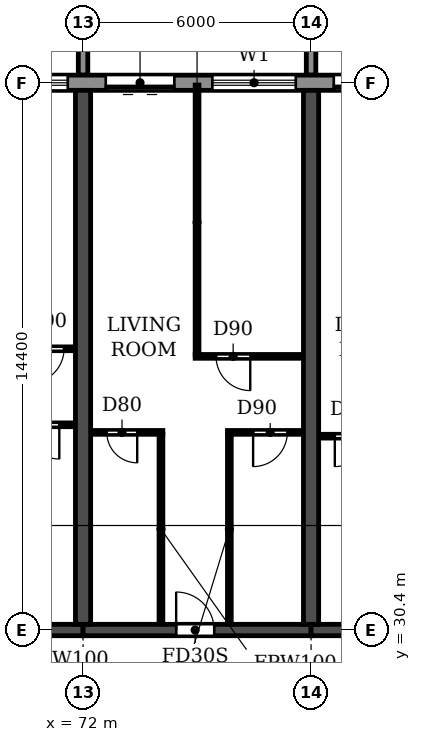
"""IFC4 building model, lengths in metres.
Left out: names, types, materials, properties, quantities, classifications, styles, units other than length and angle.
Written with IfcOpenShell. Run it as: python <this file> out.ifc"""

import sys

from ifc_helpers import new_model, si_unit, direction, frame, frame_2d, origin, place, context, subcontext, project, spatial, polyline, rectangle, outline, extrude, source, transform, mapped, element, fill, save


model = new_model("IFC4")
c1 = context("Model", 3, precision=1e-05, world=origin(), true_north=direction((0.0, 1.0)))
c2 = subcontext(c1, "Body", "Model", "MODEL_VIEW")
j1 = project(units=[si_unit("LENGTHUNIT", "METRE"), si_unit("PLANEANGLEUNIT", "RADIAN")], contexts=[c1])
p1 = place(None, origin())
s1 = spatial("IfcSite", under=j1, at=p1, CompositionType="ELEMENT")
p2 = place(p1, origin())
s2 = spatial("IfcBuilding", under=s1, at=p2, CompositionType="ELEMENT")
p3 = place(p2, frame((0.0, 0.0, 56.4)))
s3 = spatial("IfcBuildingStorey", under=s2, at=p3, CompositionType="ELEMENT", Elevation=56.4)
for number, where, z_axis, x_axis in (
    (1, (72.0, 30.55, 0.0), (0.0, 0.0, 1.0), (0.0, 1.0, 0.0)),
    (2, (78.0, 30.55, 0.0), (0.0, 0.0, 1.0), (0.0, 1.0, 0.0)),
):
    element("IfcWall", number, at=place(p3, frame(where, z_axis=z_axis, x_axis=x_axis)), inside=s3, PredefinedType="SHEAR", context=c2, shape_type="SweptSolid", body=[
        extrude(rectangle(XDim=14.05, YDim=0.4, at=frame_2d((7.025, 0.0))), origin(), (0.0, 0.0, 1.0), 3.05),
    ])
p4 = place(p3, frame((66.0, 30.4, 0.0), z_axis=(0.0, 0.0, 1.0), x_axis=(1.0, 0.0, 0.0)))
e3 = element("IfcWall", 3, at=p4, inside=s3, PredefinedType="SHEAR", context=c2, shape_type="SweptSolid", body=[
    extrude(rectangle(XDim=6.0, YDim=0.3, at=frame_2d((3.0, 0.0))), origin(), (0.0, 0.0, 1.0), 2.45),
])
p5 = place(p4, frame((2.45, 0.0, 0.0)))
e4 = element("IfcOpeningElement", 4, at=p5, cuts=e3, PredefinedType="OPENING", context=c2, shape_type="SweptSolid", body=[
    extrude(rectangle(XDim=1.0, YDim=2.1, at=frame_2d((0.5, 1.05))), frame((0.0, 0.16, 0.0), z_axis=(0.0, -1.0, 0.0), x_axis=(1.0, 0.0, 0.0)), (0.0, 0.0, 1.0), 0.32),
])
p6 = place(p3, frame((72.0, 30.4, 0.0), z_axis=(0.0, 0.0, 1.0), x_axis=(1.0, 0.0, 0.0)))
e5 = element("IfcWall", 5, at=p6, inside=s3, PredefinedType="SHEAR", context=c2, shape_type="SweptSolid", body=[
    extrude(rectangle(XDim=6.0, YDim=0.3, at=frame_2d((3.0, 0.0))), origin(), (0.0, 0.0, 1.0), 2.45),
])
p7 = place(p6, frame((2.45, 0.0, 0.0)))
e6 = element("IfcOpeningElement", 6, at=p7, cuts=e5, PredefinedType="OPENING", context=c2, shape_type="SweptSolid", body=[
    extrude(rectangle(XDim=1.0, YDim=2.1, at=frame_2d((0.5, 1.05))), frame((0.0, 0.16, 0.0), z_axis=(0.0, -1.0, 0.0), x_axis=(1.0, 0.0, 0.0)), (0.0, 0.0, 1.0), 0.32),
])
p8 = place(p3, frame((78.0, 30.4, 0.0), z_axis=(0.0, 0.0, 1.0), x_axis=(1.0, 0.0, 0.0)))
e7 = element("IfcWall", 7, at=p8, inside=s3, PredefinedType="SHEAR", context=c2, shape_type="SweptSolid", body=[
    extrude(rectangle(XDim=6.0, YDim=0.3, at=frame_2d((3.0, 0.0))), origin(), (0.0, 0.0, 1.0), 2.45),
])
p9 = place(p8, frame((2.45, 0.0, 0.0)))
e8 = element("IfcOpeningElement", 8, at=p9, cuts=e7, PredefinedType="OPENING", context=c2, shape_type="SweptSolid", body=[
    extrude(rectangle(XDim=1.0, YDim=2.1, at=frame_2d((0.5, 1.05))), frame((0.0, 0.16, 0.0), z_axis=(0.0, -1.0, 0.0), x_axis=(1.0, 0.0, 0.0)), (0.0, 0.0, 1.0), 0.32),
])
p10 = place(p3, frame((91.317, 44.8, 0.0), z_axis=(0.0, 0.0, 1.0), x_axis=(-1.0, 0.0, 0.0)))
e9 = element("IfcWall", 9, at=p10, inside=s3, PredefinedType="STANDARD", context=c2, shape_type="SweptSolid", body=[
    extrude(rectangle(XDim=80.634, YDim=0.4, at=frame_2d((40.317, 0.0))), origin(), (0.0, 0.0, 1.0), 3.05),
])
p11 = place(p10, frame((76.717, 0.0, 0.9)))
e10 = element("IfcOpeningElement", 10, at=p11, cuts=e9, PredefinedType="OPENING", context=c2, shape_type="SweptSolid", body=[
    extrude(rectangle(XDim=2.2, YDim=1.5, at=frame_2d((1.1, 0.75))), frame((0.0, 0.21, 0.0), z_axis=(0.0, -1.0, 0.0), x_axis=(1.0, 0.0, 0.0)), (0.0, 0.0, 1.0), 0.42),
])
p12 = place(p10, frame((73.917, 0.0, 0.0)))
e11 = element("IfcOpeningElement", 11, at=p12, cuts=e9, PredefinedType="OPENING", context=c2, shape_type="SweptSolid", body=[
    extrude(rectangle(XDim=1.8, YDim=2.4, at=frame_2d((0.9, 1.2))), frame((0.0, 0.21, 0.0), z_axis=(0.0, -1.0, 0.0), x_axis=(1.0, 0.0, 0.0)), (0.0, 0.0, 1.0), 0.42),
])
p13 = place(p10, frame((70.717, 0.0, 0.9)))
e12 = element("IfcOpeningElement", 12, at=p13, cuts=e9, PredefinedType="OPENING", context=c2, shape_type="SweptSolid", body=[
    extrude(rectangle(XDim=2.2, YDim=1.5, at=frame_2d((1.1, 0.75))), frame((0.0, 0.21, 0.0), z_axis=(0.0, -1.0, 0.0), x_axis=(1.0, 0.0, 0.0)), (0.0, 0.0, 1.0), 0.42),
])
p14 = place(p10, frame((67.917, 0.0, 0.0)))
e13 = element("IfcOpeningElement", 13, at=p14, cuts=e9, PredefinedType="OPENING", context=c2, shape_type="SweptSolid", body=[
    extrude(rectangle(XDim=1.8, YDim=2.4, at=frame_2d((0.9, 1.2))), frame((0.0, 0.21, 0.0), z_axis=(0.0, -1.0, 0.0), x_axis=(1.0, 0.0, 0.0)), (0.0, 0.0, 1.0), 0.42),
])
p15 = place(p10, frame((64.717, 0.0, 0.9)))
e14 = element("IfcOpeningElement", 14, at=p15, cuts=e9, PredefinedType="OPENING", context=c2, shape_type="SweptSolid", body=[
    extrude(rectangle(XDim=2.2, YDim=1.5, at=frame_2d((1.1, 0.75))), frame((0.0, 0.21, 0.0), z_axis=(0.0, -1.0, 0.0), x_axis=(1.0, 0.0, 0.0)), (0.0, 0.0, 1.0), 0.42),
])
p16 = place(p10, frame((61.917, 0.0, 0.0)))
e15 = element("IfcOpeningElement", 15, at=p16, cuts=e9, PredefinedType="OPENING", context=c2, shape_type="SweptSolid", body=[
    extrude(rectangle(XDim=1.8, YDim=2.4, at=frame_2d((0.9, 1.2))), frame((0.0, 0.21, 0.0), z_axis=(0.0, -1.0, 0.0), x_axis=(1.0, 0.0, 0.0)), (0.0, 0.0, 1.0), 0.42),
])
p17 = place(p10, frame((58.717, 0.0, 0.9)))
e16 = element("IfcOpeningElement", 16, at=p17, cuts=e9, PredefinedType="OPENING", context=c2, shape_type="SweptSolid", body=[
    extrude(rectangle(XDim=2.2, YDim=1.5, at=frame_2d((1.1, 0.75))), frame((0.0, 0.21, 0.0), z_axis=(0.0, -1.0, 0.0), x_axis=(1.0, 0.0, 0.0)), (0.0, 0.0, 1.0), 0.42),
])
p18 = place(p10, frame((55.717, 0.0, 0.9)))
e17 = element("IfcOpeningElement", 17, at=p18, cuts=e9, PredefinedType="OPENING", context=c2, shape_type="SweptSolid", body=[
    extrude(rectangle(XDim=2.2, YDim=1.5, at=frame_2d((1.1, 0.75))), frame((0.0, 0.21, 0.0), z_axis=(0.0, -1.0, 0.0), x_axis=(1.0, 0.0, 0.0)), (0.0, 0.0, 1.0), 0.42),
])
p19 = place(p10, frame((52.917, 0.0, 0.0)))
e18 = element("IfcOpeningElement", 18, at=p19, cuts=e9, PredefinedType="OPENING", context=c2, shape_type="SweptSolid", body=[
    extrude(rectangle(XDim=1.8, YDim=2.4, at=frame_2d((0.9, 1.2))), frame((0.0, 0.21, 0.0), z_axis=(0.0, -1.0, 0.0), x_axis=(1.0, 0.0, 0.0)), (0.0, 0.0, 1.0), 0.42),
])
p20 = place(p10, frame((49.717, 0.0, 0.9)))
e19 = element("IfcOpeningElement", 19, at=p20, cuts=e9, PredefinedType="OPENING", context=c2, shape_type="SweptSolid", body=[
    extrude(rectangle(XDim=2.2, YDim=1.5, at=frame_2d((1.1, 0.75))), frame((0.0, 0.21, 0.0), z_axis=(0.0, -1.0, 0.0), x_axis=(1.0, 0.0, 0.0)), (0.0, 0.0, 1.0), 0.42),
])
p21 = place(p10, frame((46.917, 0.0, 0.0)))
e20 = element("IfcOpeningElement", 20, at=p21, cuts=e9, PredefinedType="OPENING", context=c2, shape_type="SweptSolid", body=[
    extrude(rectangle(XDim=1.8, YDim=2.4, at=frame_2d((0.9, 1.2))), frame((0.0, 0.21, 0.0), z_axis=(0.0, -1.0, 0.0), x_axis=(1.0, 0.0, 0.0)), (0.0, 0.0, 1.0), 0.42),
])
p22 = place(p10, frame((43.717, 0.0, 0.9)))
e21 = element("IfcOpeningElement", 21, at=p22, cuts=e9, PredefinedType="OPENING", context=c2, shape_type="SweptSolid", body=[
    extrude(rectangle(XDim=2.2, YDim=1.5, at=frame_2d((1.1, 0.75))), frame((0.0, 0.21, 0.0), z_axis=(0.0, -1.0, 0.0), x_axis=(1.0, 0.0, 0.0)), (0.0, 0.0, 1.0), 0.42),
])
p23 = place(p10, frame((40.717, 0.0, 0.9)))
e22 = element("IfcOpeningElement", 22, at=p23, cuts=e9, PredefinedType="OPENING", context=c2, shape_type="SweptSolid", body=[
    extrude(rectangle(XDim=2.2, YDim=1.5, at=frame_2d((1.1, 0.75))), frame((0.0, 0.21, 0.0), z_axis=(0.0, -1.0, 0.0), x_axis=(1.0, 0.0, 0.0)), (0.0, 0.0, 1.0), 0.42),
])
p24 = place(p10, frame((37.717, 0.0, 0.9)))
e23 = element("IfcOpeningElement", 23, at=p24, cuts=e9, PredefinedType="OPENING", context=c2, shape_type="SweptSolid", body=[
    extrude(rectangle(XDim=2.2, YDim=1.5, at=frame_2d((1.1, 0.75))), frame((0.0, 0.21, 0.0), z_axis=(0.0, -1.0, 0.0), x_axis=(1.0, 0.0, 0.0)), (0.0, 0.0, 1.0), 0.42),
])
p25 = place(p10, frame((34.717, 0.0, 0.9)))
e24 = element("IfcOpeningElement", 24, at=p25, cuts=e9, PredefinedType="OPENING", context=c2, shape_type="SweptSolid", body=[
    extrude(rectangle(XDim=2.2, YDim=1.5, at=frame_2d((1.1, 0.75))), frame((0.0, 0.21, 0.0), z_axis=(0.0, -1.0, 0.0), x_axis=(1.0, 0.0, 0.0)), (0.0, 0.0, 1.0), 0.42),
])
p26 = place(p10, frame((31.917, 0.0, 0.0)))
e25 = element("IfcOpeningElement", 25, at=p26, cuts=e9, PredefinedType="OPENING", context=c2, shape_type="SweptSolid", body=[
    extrude(rectangle(XDim=1.8, YDim=2.4, at=frame_2d((0.9, 1.2))), frame((0.0, 0.21, 0.0), z_axis=(0.0, -1.0, 0.0), x_axis=(1.0, 0.0, 0.0)), (0.0, 0.0, 1.0), 0.42),
])
p27 = place(p10, frame((28.917, 0.0, 0.0)))
e26 = element("IfcOpeningElement", 26, at=p27, cuts=e9, PredefinedType="OPENING", context=c2, shape_type="SweptSolid", body=[
    extrude(rectangle(XDim=1.8, YDim=2.4, at=frame_2d((0.9, 1.2))), frame((0.0, 0.21, 0.0), z_axis=(0.0, -1.0, 0.0), x_axis=(1.0, 0.0, 0.0)), (0.0, 0.0, 1.0), 0.42),
])
p28 = place(p10, frame((25.717, 0.0, 0.9)))
e27 = element("IfcOpeningElement", 27, at=p28, cuts=e9, PredefinedType="OPENING", context=c2, shape_type="SweptSolid", body=[
    extrude(rectangle(XDim=2.2, YDim=1.5, at=frame_2d((1.1, 0.75))), frame((0.0, 0.21, 0.0), z_axis=(0.0, -1.0, 0.0), x_axis=(1.0, 0.0, 0.0)), (0.0, 0.0, 1.0), 0.42),
])
p29 = place(p10, frame((22.917, 0.0, 0.0)))
e28 = element("IfcOpeningElement", 28, at=p29, cuts=e9, PredefinedType="OPENING", context=c2, shape_type="SweptSolid", body=[
    extrude(rectangle(XDim=1.8, YDim=2.4, at=frame_2d((0.9, 1.2))), frame((0.0, 0.21, 0.0), z_axis=(0.0, -1.0, 0.0), x_axis=(1.0, 0.0, 0.0)), (0.0, 0.0, 1.0), 0.42),
])
p30 = place(p10, frame((19.717, 0.0, 0.9)))
e29 = element("IfcOpeningElement", 29, at=p30, cuts=e9, PredefinedType="OPENING", context=c2, shape_type="SweptSolid", body=[
    extrude(rectangle(XDim=2.2, YDim=1.5, at=frame_2d((1.1, 0.75))), frame((0.0, 0.21, 0.0), z_axis=(0.0, -1.0, 0.0), x_axis=(1.0, 0.0, 0.0)), (0.0, 0.0, 1.0), 0.42),
])
p31 = place(p10, frame((16.917, 0.0, 0.0)))
e30 = element("IfcOpeningElement", 30, at=p31, cuts=e9, PredefinedType="OPENING", context=c2, shape_type="SweptSolid", body=[
    extrude(rectangle(XDim=1.8, YDim=2.4, at=frame_2d((0.9, 1.2))), frame((0.0, 0.21, 0.0), z_axis=(0.0, -1.0, 0.0), x_axis=(1.0, 0.0, 0.0)), (0.0, 0.0, 1.0), 0.42),
])
p32 = place(p10, frame((13.717, 0.0, 0.9)))
e31 = element("IfcOpeningElement", 31, at=p32, cuts=e9, PredefinedType="OPENING", context=c2, shape_type="SweptSolid", body=[
    extrude(rectangle(XDim=2.2, YDim=1.5, at=frame_2d((1.1, 0.75))), frame((0.0, 0.21, 0.0), z_axis=(0.0, -1.0, 0.0), x_axis=(1.0, 0.0, 0.0)), (0.0, 0.0, 1.0), 0.42),
])
p33 = place(p10, frame((10.917, 0.0, 0.0)))
e32 = element("IfcOpeningElement", 32, at=p33, cuts=e9, PredefinedType="OPENING", context=c2, shape_type="SweptSolid", body=[
    extrude(rectangle(XDim=1.8, YDim=2.4, at=frame_2d((0.9, 1.2))), frame((0.0, 0.21, 0.0), z_axis=(0.0, -1.0, 0.0), x_axis=(1.0, 0.0, 0.0)), (0.0, 0.0, 1.0), 0.42),
])
p34 = place(p10, frame((7.717, 0.0, 0.9)))
e33 = element("IfcOpeningElement", 33, at=p34, cuts=e9, PredefinedType="OPENING", context=c2, shape_type="SweptSolid", body=[
    extrude(rectangle(XDim=2.2, YDim=1.5, at=frame_2d((1.1, 0.75))), frame((0.0, 0.21, 0.0), z_axis=(0.0, -1.0, 0.0), x_axis=(1.0, 0.0, 0.0)), (0.0, 0.0, 1.0), 0.42),
])
p35 = place(p10, frame((4.717, 0.0, 0.9)))
e34 = element("IfcOpeningElement", 34, at=p35, cuts=e9, PredefinedType="OPENING", context=c2, shape_type="SweptSolid", body=[
    extrude(rectangle(XDim=2.2, YDim=1.5, at=frame_2d((1.1, 0.75))), frame((0.0, 0.21, 0.0), z_axis=(0.0, -1.0, 0.0), x_axis=(1.0, 0.0, 0.0)), (0.0, 0.0, 1.0), 0.42),
])
p36 = place(p10, frame((1.717, 0.0, 0.9)))
e35 = element("IfcOpeningElement", 35, at=p36, cuts=e9, PredefinedType="OPENING", context=c2, shape_type="SweptSolid", body=[
    extrude(rectangle(XDim=2.2, YDim=1.5, at=frame_2d((1.1, 0.75))), frame((0.0, 0.21, 0.0), z_axis=(0.0, -1.0, 0.0), x_axis=(1.0, 0.0, 0.0)), (0.0, 0.0, 1.0), 0.42),
])
m1 = source(origin(), c2, "Body", "SweptSolid", [
    extrude(outline(polyline([(0.0, 0.0), (0.25, 0.0), (0.25, 3.1), (0.0, 3.1), (0.0, 0.0)])), origin(), (0.0, 0.0, 1.0), 3.1),
])
for number, where in (
    (36, (71.875, 45.0, 0.0)),
    (37, (77.875, 45.0, 0.0)),
):
    element("IfcWall", number, at=place(p3, frame(where)), inside=s3, PredefinedType="STANDARD", context=c2, shape_type="MappedRepresentation", body=[
        mapped(m1, transform((0.0, 0.0, 0.0))),
    ])
p37 = place(p3, frame((78.21, 35.5, 0.0), z_axis=(0.0, 0.0, 1.0), x_axis=(1.0, 0.0, 0.0)))
e38 = element("IfcWall", 38, at=p37, inside=s3, PredefinedType="PARTITIONING", context=c2, shape_type="SweptSolid", body=[
    extrude(rectangle(XDim=1.89, YDim=0.1, at=frame_2d((0.945, 0.0))), origin(), (0.0, 0.0, 1.0), 3.05),
])
p38 = place(p37, frame((0.415, 0.0, 0.0)))
e39 = element("IfcOpeningElement", 39, at=p38, cuts=e38, PredefinedType="OPENING", context=c2, shape_type="SweptSolid", body=[
    extrude(rectangle(XDim=0.8, YDim=2.1, at=frame_2d((0.4, 1.05))), frame((0.0, 0.06, 0.0), z_axis=(0.0, -1.0, 0.0), x_axis=(1.0, 0.0, 0.0)), (0.0, 0.0, 1.0), 0.12),
])
p39 = place(p3, frame((72.21, 35.6, 0.0), z_axis=(0.0, 0.0, 1.0), x_axis=(1.0, 0.0, 0.0)))
e40 = element("IfcWall", 40, at=p39, inside=s3, PredefinedType="PARTITIONING", context=c2, shape_type="SweptSolid", body=[
    extrude(rectangle(XDim=1.89, YDim=0.1, at=frame_2d((0.945, 0.0))), origin(), (0.0, 0.0, 1.0), 3.05),
])
p40 = place(p39, frame((0.415, 0.0, 0.0)))
e41 = element("IfcOpeningElement", 41, at=p40, cuts=e40, PredefinedType="OPENING", context=c2, shape_type="SweptSolid", body=[
    extrude(rectangle(XDim=0.8, YDim=2.1, at=frame_2d((0.4, 1.05))), frame((0.0, 0.06, 0.0), z_axis=(0.0, -1.0, 0.0), x_axis=(1.0, 0.0, 0.0)), (0.0, 0.0, 1.0), 0.12),
])
p41 = place(p3, frame((75.8, 35.6, 0.0), z_axis=(0.0, 0.0, 1.0), x_axis=(1.0, 0.0, 0.0)))
e42 = element("IfcWall", 42, at=p41, inside=s3, PredefinedType="PARTITIONING", context=c2, shape_type="SweptSolid", body=[
    extrude(rectangle(XDim=1.99, YDim=0.1, at=frame_2d((0.995, 0.0))), origin(), (0.0, 0.0, 1.0), 3.05),
])
p42 = place(p41, frame((0.675, 0.0, 0.0)))
e43 = element("IfcOpeningElement", 43, at=p42, cuts=e42, PredefinedType="OPENING", context=c2, shape_type="SweptSolid", body=[
    extrude(rectangle(XDim=0.9, YDim=2.1, at=frame_2d((0.45, 1.05))), frame((0.0, 0.06, 0.0), z_axis=(0.0, -1.0, 0.0), x_axis=(1.0, 0.0, 0.0)), (0.0, 0.0, 1.0), 0.12),
])
p43 = place(p3, frame((69.8, 35.8, 0.0), z_axis=(0.0, 0.0, 1.0), x_axis=(1.0, 0.0, 0.0)))
e44 = element("IfcWall", 44, at=p43, inside=s3, PredefinedType="PARTITIONING", context=c2, shape_type="SweptSolid", body=[
    extrude(rectangle(XDim=1.99, YDim=0.1, at=frame_2d((0.995, 0.0))), origin(), (0.0, 0.0, 1.0), 3.05),
])
p44 = place(p43, frame((0.675, 0.0, 0.0)))
e45 = element("IfcOpeningElement", 45, at=p44, cuts=e44, PredefinedType="OPENING", context=c2, shape_type="SweptSolid", body=[
    extrude(rectangle(XDim=0.9, YDim=2.1, at=frame_2d((0.45, 1.05))), frame((0.0, 0.06, 0.0), z_axis=(0.0, -1.0, 0.0), x_axis=(1.0, 0.0, 0.0)), (0.0, 0.0, 1.0), 0.12),
])
p45 = place(p3, frame((74.95, 37.6, 0.0), z_axis=(0.0, 0.0, 1.0), x_axis=(1.0, 0.0, 0.0)))
e46 = element("IfcWall", 46, at=p45, inside=s3, PredefinedType="PARTITIONING", context=c2, shape_type="SweptSolid", body=[
    extrude(rectangle(XDim=2.84, YDim=0.1, at=frame_2d((1.42, 0.0))), origin(), (0.0, 0.0, 1.0), 3.05),
])
p46 = place(p45, frame((0.55, 0.0, 0.0)))
e47 = element("IfcOpeningElement", 47, at=p46, cuts=e46, PredefinedType="OPENING", context=c2, shape_type="SweptSolid", body=[
    extrude(rectangle(XDim=0.9, YDim=2.1, at=frame_2d((0.45, 1.05))), frame((0.0, 0.06, 0.0), z_axis=(0.0, -1.0, 0.0), x_axis=(1.0, 0.0, 0.0)), (0.0, 0.0, 1.0), 0.12),
])
p47 = place(p3, frame((68.95, 37.8, 0.0), z_axis=(0.0, 0.0, 1.0), x_axis=(1.0, 0.0, 0.0)))
e48 = element("IfcWall", 48, at=p47, inside=s3, PredefinedType="PARTITIONING", context=c2, shape_type="SweptSolid", body=[
    extrude(rectangle(XDim=2.84, YDim=0.1, at=frame_2d((1.42, 0.0))), origin(), (0.0, 0.0, 1.0), 3.05),
])
p48 = place(p47, frame((1.65, 0.0, 0.0)))
e49 = element("IfcOpeningElement", 49, at=p48, cuts=e48, PredefinedType="OPENING", context=c2, shape_type="SweptSolid", body=[
    extrude(rectangle(XDim=0.9, YDim=2.1, at=frame_2d((0.45, 1.05))), frame((0.0, 0.06, 0.0), z_axis=(0.0, -1.0, 0.0), x_axis=(1.0, 0.0, 0.0)), (0.0, 0.0, 1.0), 0.12),
])
p49 = place(p3, frame((74.05, 30.56, 0.0), z_axis=(0.0, 0.0, 1.0), x_axis=(0.0, 1.0, 0.0)))
e50 = element("IfcWall", 50, at=p49, inside=s3, PredefinedType="PARTITIONING", context=c2, shape_type="SweptSolid", body=[
    extrude(rectangle(XDim=4.99, YDim=0.1, at=frame_2d((2.495, 0.0))), origin(), (0.0, 0.0, 1.0), 3.05),
])
p50 = place(p3, frame((75.0, 37.65, 0.0), z_axis=(0.0, 0.0, 1.0), x_axis=(0.0, 1.0, 0.0)))
e51 = element("IfcWall", 51, at=p50, inside=s3, PredefinedType="PARTITIONING", context=c2, shape_type="SweptSolid", body=[
    extrude(rectangle(XDim=7.09, YDim=0.1, at=frame_2d((3.545, 0.0))), origin(), (0.0, 0.0, 1.0), 3.05),
])
p51 = place(p3, frame((75.85, 30.56, 0.0), z_axis=(0.0, 0.0, 1.0), x_axis=(0.0, 1.0, 0.0)))
e52 = element("IfcWall", 52, at=p51, inside=s3, PredefinedType="PARTITIONING", context=c2, shape_type="SweptSolid", body=[
    extrude(rectangle(XDim=4.99, YDim=0.1, at=frame_2d((2.495, 0.0))), origin(), (0.0, 0.0, 1.0), 3.05),
])
p52 = place(p30, origin())
e53 = element("IfcWindow", 53, at=p52, inside=s3, PartitioningType="DOUBLE_PANEL_HORIZONTAL", PredefinedType="WINDOW", context=c2, shape_type="SweptSolid", body=[
    extrude(rectangle(XDim=2.2, YDim=1.5, at=frame_2d((1.1, 0.75))), frame((0.0, 0.03, 0.0), z_axis=(0.0, -1.0, 0.0), x_axis=(1.0, 0.0, 0.0)), (0.0, 0.0, 1.0), 0.06),
])
fill(e29, e53)
p53 = place(p31, origin())
e54 = element("IfcDoor", 54, at=p53, inside=s3, OperationType="DOUBLE_DOOR_SLIDING", PredefinedType="DOOR", context=c2, shape_type="SweptSolid", body=[
    extrude(rectangle(XDim=1.8, YDim=2.4, at=frame_2d((0.9, 1.2))), frame((0.0, 0.025, 0.0), z_axis=(0.0, -1.0, 0.0), x_axis=(1.0, 0.0, 0.0)), (0.0, 0.0, 1.0), 0.05),
])
fill(e30, e54)
p54 = place(p32, origin())
e55 = element("IfcWindow", 55, at=p54, inside=s3, PartitioningType="DOUBLE_PANEL_HORIZONTAL", PredefinedType="WINDOW", context=c2, shape_type="SweptSolid", body=[
    extrude(rectangle(XDim=2.2, YDim=1.5, at=frame_2d((1.1, 0.75))), frame((0.0, 0.03, 0.0), z_axis=(0.0, -1.0, 0.0), x_axis=(1.0, 0.0, 0.0)), (0.0, 0.0, 1.0), 0.06),
])
fill(e31, e55)
p55 = place(p33, origin())
e56 = element("IfcDoor", 56, at=p55, inside=s3, OperationType="DOUBLE_DOOR_SLIDING", PredefinedType="DOOR", context=c2, shape_type="SweptSolid", body=[
    extrude(rectangle(XDim=1.8, YDim=2.4, at=frame_2d((0.9, 1.2))), frame((0.0, 0.025, 0.0), z_axis=(0.0, -1.0, 0.0), x_axis=(1.0, 0.0, 0.0)), (0.0, 0.0, 1.0), 0.05),
])
fill(e32, e56)
p56 = place(p44, frame((0.9, 0.0, 0.0), z_axis=(0.0, 0.0, 1.0), x_axis=(-1.0, 0.0, 0.0)))
e57 = element("IfcDoor", 57, at=p56, inside=s3, OperationType="SINGLE_SWING_LEFT", PredefinedType="DOOR", context=c2, shape_type="SweptSolid", body=[
    extrude(rectangle(XDim=0.9, YDim=2.1, at=frame_2d((0.45, 1.05))), frame((0.0, 0.025, 0.0), z_axis=(0.0, -1.0, 0.0), x_axis=(1.0, 0.0, 0.0)), (0.0, 0.0, 1.0), 0.05),
])
fill(e45, e57)
p57 = place(p48, frame((0.9, 0.0, 0.0), z_axis=(0.0, 0.0, 1.0), x_axis=(-1.0, 0.0, 0.0)))
e58 = element("IfcDoor", 58, at=p57, inside=s3, OperationType="SINGLE_SWING_RIGHT", PredefinedType="DOOR", context=c2, shape_type="SweptSolid", body=[
    extrude(rectangle(XDim=0.9, YDim=2.1, at=frame_2d((0.45, 1.05))), frame((0.0, 0.025, 0.0), z_axis=(0.0, -1.0, 0.0), x_axis=(1.0, 0.0, 0.0)), (0.0, 0.0, 1.0), 0.05),
])
fill(e49, e58)
p58 = place(p40, frame((0.8, 0.0, 0.0), z_axis=(0.0, 0.0, 1.0), x_axis=(-1.0, 0.0, 0.0)))
e59 = element("IfcDoor", 59, at=p58, inside=s3, OperationType="SINGLE_SWING_LEFT", PredefinedType="DOOR", context=c2, shape_type="SweptSolid", body=[
    extrude(rectangle(XDim=0.8, YDim=2.1, at=frame_2d((0.4, 1.05))), frame((0.0, 0.025, 0.0), z_axis=(0.0, -1.0, 0.0), x_axis=(1.0, 0.0, 0.0)), (0.0, 0.0, 1.0), 0.05),
])
fill(e41, e59)
p59 = place(p7, origin())
e60 = element("IfcDoor", 60, at=p59, inside=s3, OperationType="SINGLE_SWING_LEFT", PredefinedType="DOOR", context=c2, shape_type="SweptSolid", body=[
    extrude(rectangle(XDim=1.0, YDim=2.1, at=frame_2d((0.5, 1.05))), frame((0.0, 0.025, 0.0), z_axis=(0.0, -1.0, 0.0), x_axis=(1.0, 0.0, 0.0)), (0.0, 0.0, 1.0), 0.05),
])
fill(e6, e60)
p60 = place(p46, frame((0.9, 0.0, 0.0), z_axis=(0.0, 0.0, 1.0), x_axis=(-1.0, 0.0, 0.0)))
e61 = element("IfcDoor", 61, at=p60, inside=s3, OperationType="SINGLE_SWING_LEFT", PredefinedType="DOOR", context=c2, shape_type="SweptSolid", body=[
    extrude(rectangle(XDim=0.9, YDim=2.1, at=frame_2d((0.45, 1.05))), frame((0.0, 0.025, 0.0), z_axis=(0.0, -1.0, 0.0), x_axis=(1.0, 0.0, 0.0)), (0.0, 0.0, 1.0), 0.05),
])
fill(e47, e61)
p61 = place(p42, frame((0.9, 0.0, 0.0), z_axis=(0.0, 0.0, 1.0), x_axis=(-1.0, 0.0, 0.0)))
e62 = element("IfcDoor", 62, at=p61, inside=s3, OperationType="SINGLE_SWING_RIGHT", PredefinedType="DOOR", context=c2, shape_type="SweptSolid", body=[
    extrude(rectangle(XDim=0.9, YDim=2.1, at=frame_2d((0.45, 1.05))), frame((0.0, 0.025, 0.0), z_axis=(0.0, -1.0, 0.0), x_axis=(1.0, 0.0, 0.0)), (0.0, 0.0, 1.0), 0.05),
])
fill(e43, e62)
p62 = place(p38, frame((0.8, 0.0, 0.0), z_axis=(0.0, 0.0, 1.0), x_axis=(-1.0, 0.0, 0.0)))
e63 = element("IfcDoor", 63, at=p62, inside=s3, OperationType="SINGLE_SWING_RIGHT", PredefinedType="DOOR", context=c2, shape_type="SweptSolid", body=[
    extrude(rectangle(XDim=0.8, YDim=2.1, at=frame_2d((0.4, 1.05))), frame((0.0, 0.025, 0.0), z_axis=(0.0, -1.0, 0.0), x_axis=(1.0, 0.0, 0.0)), (0.0, 0.0, 1.0), 0.05),
])
fill(e39, e63)
save(model, sys.argv[1])
